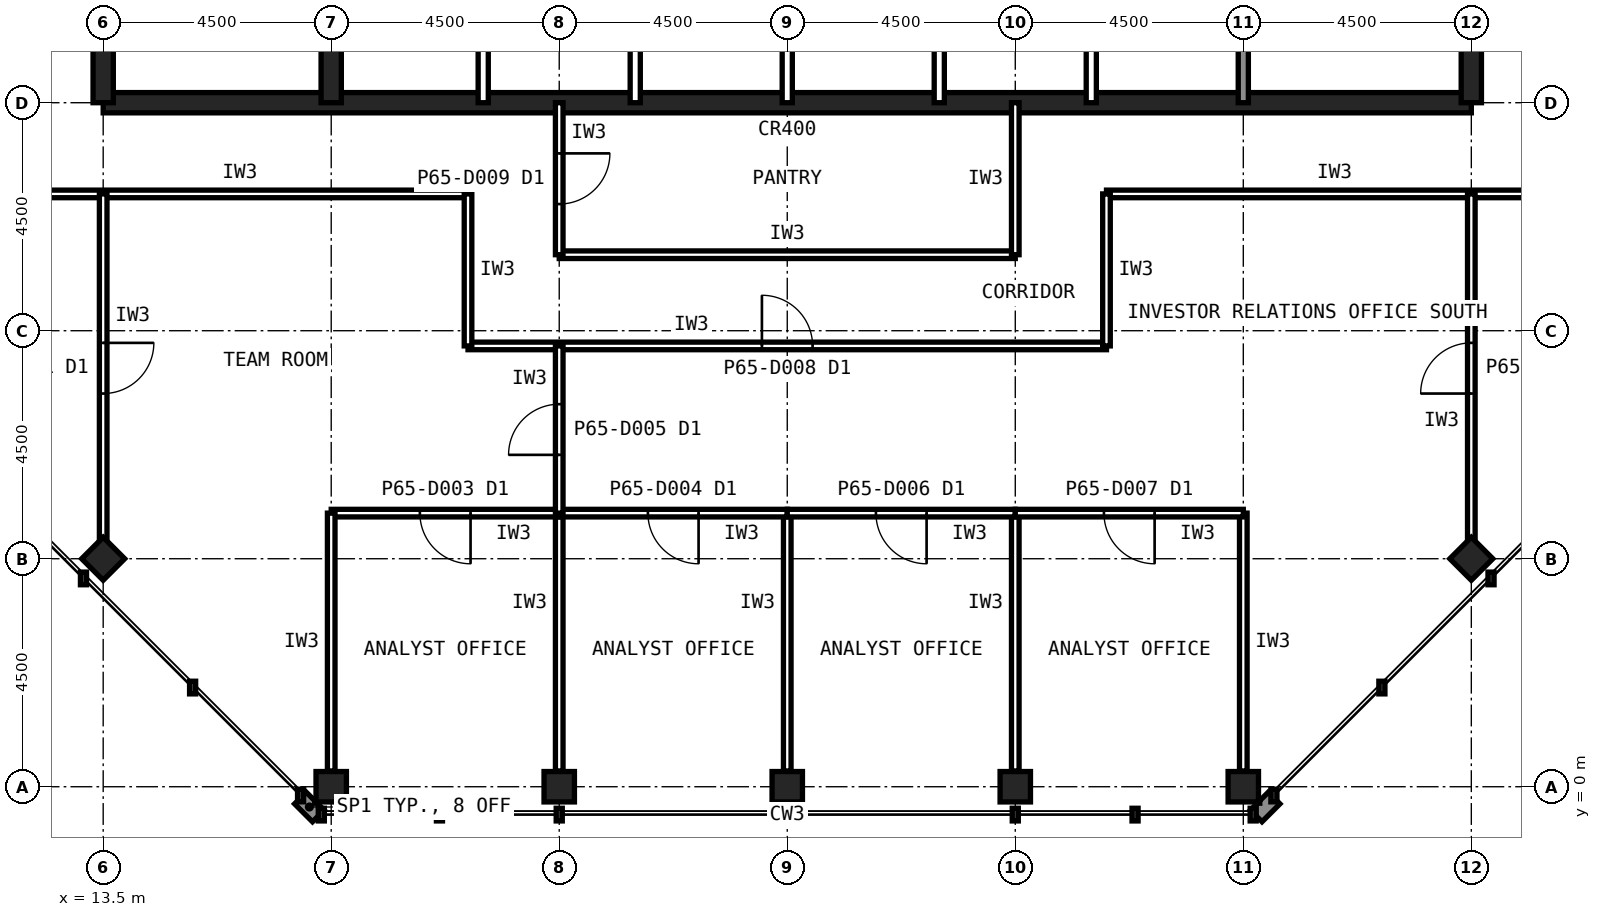
"""IFC4 building model, lengths in metres.
Left out: names, types, materials, properties, quantities, classifications, styles, units other than length and angle.
Written with IfcOpenShell. Run it as: python <this file> out.ifc"""

import sys

from ifc_helpers import new_model, si_unit, direction, frame, frame_2d, origin, origin_2d, place, context, subcontext, project, spatial, rectangle, hollow_rectangle, extrude, element, fill, save


model = new_model("IFC4")
c1 = context("Model", 3, precision=1e-05, world=origin(), true_north=direction((0.0, 1.0)))
c2 = subcontext(c1, "Body", "Model", "MODEL_VIEW")
j1 = project(units=[si_unit("LENGTHUNIT", "METRE"), si_unit("PLANEANGLEUNIT", "RADIAN")], contexts=[c1])
p1 = place(None, origin())
s1 = spatial("IfcSite", under=j1, at=p1, CompositionType="ELEMENT")
p2 = place(p1, origin())
s2 = spatial("IfcBuilding", under=s1, at=p2, CompositionType="ELEMENT")
p3 = place(p2, frame((0.0, 0.0, 270.6)))
s3 = spatial("IfcBuildingStorey", under=s2, at=p3, CompositionType="ELEMENT", Elevation=270.6)
for number, where, z_axis, x_axis in (
    (1, (18.0, 0.0, 0.0), (0.0, 0.0, 1.0), (1.0, 0.0, 0.0)),
    (2, (22.5, 0.0, 0.0), (0.0, 0.0, 1.0), (1.0, 0.0, 0.0)),
    (3, (27.0, 0.0, 0.0), (0.0, 0.0, 1.0), (1.0, 0.0, 0.0)),
    (4, (31.5, 0.0, 0.0), (0.0, 0.0, 1.0), (1.0, 0.0, 0.0)),
    (5, (36.0, 0.0, 0.0), (0.0, 0.0, 1.0), (1.0, 0.0, 0.0)),
    (6, (13.5, 4.5, 0.0), (0.0, 0.0, 1.0), (0.707, 0.707, 0.0)),
    (7, (40.5, 4.5, 0.0), (0.0, 0.0, 1.0), (0.707, 0.707, 0.0)),
):
    element("IfcColumn", number, at=place(p3, frame(where, z_axis=z_axis, x_axis=x_axis)), inside=s3, PredefinedType="COLUMN", context=c2, shape_type="SweptSolid", body=[
        extrude(hollow_rectangle(XDim=0.6, YDim=0.6, WallThickness=0.028, at=origin_2d()), origin(), (0.0, 0.0, 1.0), 4.0),
    ])
p4 = place(p3, frame((13.5, 13.5, 0.0), z_axis=(0.0, 0.0, 1.0), x_axis=(1.0, 0.0, 0.0)))
e8 = element("IfcWall", 8, at=p4, inside=s3, PredefinedType="SHEAR", context=c2, shape_type="SweptSolid", body=[
    extrude(rectangle(XDim=27.0, YDim=0.4, at=frame_2d((13.5, 0.0))), origin(), (0.0, 0.0, 1.0), 4.0),
])
p5 = place(p3, frame((40.5, 13.5, 0.0), z_axis=(0.0, 0.0, 1.0), x_axis=(0.0, 1.0, 0.0)))
e9 = element("IfcWall", 9, at=p5, inside=s3, PredefinedType="SHEAR", context=c2, shape_type="SweptSolid", body=[
    extrude(rectangle(XDim=27.0, YDim=0.4, at=frame_2d((13.5, 0.0))), origin(), (0.0, 0.0, 1.0), 4.0),
])
p6 = place(p5, frame((5.85, 0.0, 0.0)))
e10 = element("IfcOpeningElement", 10, at=p6, cuts=e9, PredefinedType="OPENING", context=c2, shape_type="SweptSolid", body=[
    extrude(rectangle(XDim=1.8, YDim=2.1, at=frame_2d((0.9, 1.05))), frame((0.0, 0.21, 0.0), z_axis=(0.0, -1.0, 0.0), x_axis=(1.0, 0.0, 0.0)), (0.0, 0.0, 1.0), 0.42),
])
p7 = place(p5, frame((19.65, 0.0, 0.0)))
e11 = element("IfcOpeningElement", 11, at=p7, cuts=e9, PredefinedType="OPENING", context=c2, shape_type="SweptSolid", body=[
    extrude(rectangle(XDim=1.2, YDim=2.1, at=frame_2d((0.6, 1.05))), frame((0.0, 0.21, 0.0), z_axis=(0.0, -1.0, 0.0), x_axis=(1.0, 0.0, 0.0)), (0.0, 0.0, 1.0), 0.42),
])
p8 = place(p3, frame((13.5, 40.5, 0.0), z_axis=(0.0, 0.0, 1.0), x_axis=(0.0, -1.0, 0.0)))
e12 = element("IfcWall", 12, at=p8, inside=s3, PredefinedType="SHEAR", context=c2, shape_type="SweptSolid", body=[
    extrude(rectangle(XDim=27.0, YDim=0.4, at=frame_2d((13.5, 0.0))), origin(), (0.0, 0.0, 1.0), 4.0),
])
p9 = place(p8, frame((19.65, 0.0, 0.0)))
e13 = element("IfcOpeningElement", 13, at=p9, cuts=e12, PredefinedType="OPENING", context=c2, shape_type="SweptSolid", body=[
    extrude(rectangle(XDim=1.2, YDim=2.1, at=frame_2d((0.6, 1.05))), frame((0.0, 0.21, 0.0), z_axis=(0.0, -1.0, 0.0), x_axis=(1.0, 0.0, 0.0)), (0.0, 0.0, 1.0), 0.42),
])
p10 = place(p8, frame((5.85, 0.0, 0.0)))
e14 = element("IfcOpeningElement", 14, at=p10, cuts=e12, PredefinedType="OPENING", context=c2, shape_type="SweptSolid", body=[
    extrude(rectangle(XDim=1.8, YDim=2.1, at=frame_2d((0.9, 1.05))), frame((0.0, 0.21, 0.0), z_axis=(0.0, -1.0, 0.0), x_axis=(1.0, 0.0, 0.0)), (0.0, 0.0, 1.0), 0.42),
])
p11 = place(p3, frame((18.0, 13.5, 0.0), z_axis=(0.0, 0.0, 1.0), x_axis=(0.0, 1.0, 0.0)))
e15 = element("IfcWall", 15, at=p11, inside=s3, PredefinedType="SHEAR", context=c2, shape_type="SweptSolid", body=[
    extrude(rectangle(XDim=18.0, YDim=0.4, at=frame_2d((9.0, 0.0))), origin(), (0.0, 0.0, 1.0), 4.0),
])
p12 = place(p3, frame((36.0, 13.5, 0.0), z_axis=(0.0, 0.0, 1.0), x_axis=(0.0, 1.0, 0.0)))
e16 = element("IfcWall", 16, at=p12, inside=s3, PredefinedType="SOLIDWALL", context=c2, shape_type="SweptSolid", body=[
    extrude(rectangle(XDim=4.5, YDim=0.2, at=frame_2d((2.25, 0.0))), origin(), (0.0, 0.0, 1.0), 3.84),
])
for number, where, z_axis, x_axis in (
    (17, (21.0, 13.5, 0.0), (0.0, 0.0, 1.0), (0.0, 1.0, 0.0)),
    (18, (24.0, 13.5, 0.0), (0.0, 0.0, 1.0), (0.0, 1.0, 0.0)),
    (19, (27.0, 13.5, 0.0), (0.0, 0.0, 1.0), (0.0, 1.0, 0.0)),
    (20, (30.0, 13.5, 0.0), (0.0, 0.0, 1.0), (0.0, 1.0, 0.0)),
    (21, (33.0, 13.5, 0.0), (0.0, 0.0, 1.0), (0.0, 1.0, 0.0)),
):
    element("IfcWall", number, at=place(p3, frame(where, z_axis=z_axis, x_axis=x_axis)), inside=s3, PredefinedType="PARTITIONING", context=c2, shape_type="SweptSolid", body=[
        extrude(rectangle(XDim=4.5, YDim=0.2, at=frame_2d((2.25, 0.0))), origin(), (0.0, 0.0, 1.0), 3.84),
    ])
p13 = place(p3, frame((20.7, 8.7, 0.0), z_axis=(0.0, 0.0, 1.0), x_axis=(1.0, 0.0, 0.0)))
e22 = element("IfcWall", 22, at=p13, inside=s3, PredefinedType="PARTITIONING", context=c2, shape_type="SweptSolid", body=[
    extrude(rectangle(XDim=12.6, YDim=0.15, at=frame_2d((6.3, 0.0))), origin(), (0.0, 0.0, 1.0), 3.84),
])
p14 = place(p13, frame((5.8, 0.0, 0.0)))
e23 = element("IfcOpeningElement", 23, at=p14, cuts=e22, PredefinedType="OPENING", context=c2, shape_type="SweptSolid", body=[
    extrude(rectangle(XDim=1.0, YDim=2.1, at=frame_2d((0.5, 1.05))), frame((0.0, 0.085, 0.0), z_axis=(0.0, -1.0, 0.0), x_axis=(1.0, 0.0, 0.0)), (0.0, 0.0, 1.0), 0.17),
])
for number, where, z_axis, x_axis in (
    (24, (11.7, 11.7, 0.0), (0.0, 0.0, 1.0), (1.0, 0.0, 0.0)),
    (25, (33.3, 11.7, 0.0), (0.0, 0.0, 1.0), (1.0, 0.0, 0.0)),
):
    element("IfcWall", number, at=place(p3, frame(where, z_axis=z_axis, x_axis=x_axis)), inside=s3, PredefinedType="PARTITIONING", context=c2, shape_type="SweptSolid", body=[
        extrude(rectangle(XDim=9.0, YDim=0.15, at=frame_2d((4.5, 0.0))), origin(), (0.0, 0.0, 1.0), 3.84),
    ])
for number, where, z_axis, x_axis in (
    (26, (20.7, 11.7, 0.0), (0.0, 0.0, 1.0), (0.0, -1.0, 0.0)),
    (27, (33.3, 8.7, 0.0), (0.0, 0.0, 1.0), (0.0, 1.0, 0.0)),
):
    element("IfcWall", number, at=place(p3, frame(where, z_axis=z_axis, x_axis=x_axis)), inside=s3, PredefinedType="PARTITIONING", context=c2, shape_type="SweptSolid", body=[
        extrude(rectangle(XDim=3.0, YDim=0.15, at=frame_2d((1.5, 0.0))), origin(), (0.0, 0.0, 1.0), 3.84),
    ])
p15 = place(p3, frame((22.5, 10.5, 0.0), z_axis=(0.0, 0.0, 1.0), x_axis=(1.0, 0.0, 0.0)))
e28 = element("IfcWall", 28, at=p15, inside=s3, PredefinedType="PARTITIONING", context=c2, shape_type="SweptSolid", body=[
    extrude(rectangle(XDim=9.0, YDim=0.15, at=frame_2d((4.5, 0.0))), origin(), (0.0, 0.0, 1.0), 3.84),
])
p16 = place(p3, frame((31.5, 10.5, 0.0), z_axis=(0.0, 0.0, 1.0), x_axis=(0.0, 1.0, 0.0)))
e29 = element("IfcWall", 29, at=p16, inside=s3, PredefinedType="PARTITIONING", context=c2, shape_type="SweptSolid", body=[
    extrude(rectangle(XDim=3.0, YDim=0.15, at=frame_2d((1.5, 0.0))), origin(), (0.0, 0.0, 1.0), 2.989),
])
p17 = place(p3, frame((22.5, 13.5, 0.0), z_axis=(0.0, 0.0, 1.0), x_axis=(0.0, -1.0, 0.0)))
e30 = element("IfcWall", 30, at=p17, inside=s3, PredefinedType="PARTITIONING", context=c2, shape_type="SweptSolid", body=[
    extrude(rectangle(XDim=3.0, YDim=0.15, at=frame_2d((1.5, 0.0))), origin(), (0.0, 0.0, 1.0), 2.989),
])
p18 = place(p17, frame((1.0, 0.0, 0.0)))
e31 = element("IfcOpeningElement", 31, at=p18, cuts=e30, PredefinedType="OPENING", context=c2, shape_type="SweptSolid", body=[
    extrude(rectangle(XDim=1.0, YDim=2.1, at=frame_2d((0.5, 1.05))), frame((0.0, 0.085, 0.0), z_axis=(0.0, -1.0, 0.0), x_axis=(1.0, 0.0, 0.0)), (0.0, 0.0, 1.0), 0.17),
])
p19 = place(p3, frame((22.5, 0.31, 0.0), z_axis=(0.0, 0.0, 1.0), x_axis=(0.0, 1.0, 0.0)))
e32 = element("IfcWall", 32, at=p19, inside=s3, PredefinedType="PARTITIONING", context=c2, shape_type="SweptSolid", body=[
    extrude(rectangle(XDim=5.09, YDim=0.15, at=frame_2d((2.545, 0.0))), origin(), (0.0, 0.0, 1.0), 2.989),
])
p20 = place(p3, frame((22.5, 5.4, 0.0), z_axis=(0.0, 0.0, 1.0), x_axis=(-1.0, 0.0, 0.0)))
e33 = element("IfcWall", 33, at=p20, inside=s3, PredefinedType="PARTITIONING", context=c2, shape_type="SweptSolid", body=[
    extrude(rectangle(XDim=4.5, YDim=0.15, at=frame_2d((2.25, 0.0))), origin(), (0.0, 0.0, 1.0), 3.84),
])
p21 = place(p20, frame((1.75, 0.0, 0.0)))
e34 = element("IfcOpeningElement", 34, at=p21, cuts=e33, PredefinedType="OPENING", context=c2, shape_type="SweptSolid", body=[
    extrude(rectangle(XDim=1.0, YDim=2.1, at=frame_2d((0.5, 1.05))), frame((0.0, 0.085, 0.0), z_axis=(0.0, -1.0, 0.0), x_axis=(1.0, 0.0, 0.0)), (0.0, 0.0, 1.0), 0.17),
])
for number, where, z_axis, x_axis in (
    (35, (18.0, 5.4, 0.0), (0.0, 0.0, 1.0), (0.0, -1.0, 0.0)),
    (36, (27.0, 0.31, 0.0), (0.0, 0.0, 1.0), (0.0, 1.0, 0.0)),
):
    element("IfcWall", number, at=place(p3, frame(where, z_axis=z_axis, x_axis=x_axis)), inside=s3, PredefinedType="PARTITIONING", context=c2, shape_type="SweptSolid", body=[
        extrude(rectangle(XDim=5.09, YDim=0.15, at=frame_2d((2.545, 0.0))), origin(), (0.0, 0.0, 1.0), 2.989),
    ])
p22 = place(p3, frame((27.0, 5.4, 0.0), z_axis=(0.0, 0.0, 1.0), x_axis=(-1.0, 0.0, 0.0)))
e37 = element("IfcWall", 37, at=p22, inside=s3, PredefinedType="PARTITIONING", context=c2, shape_type="SweptSolid", body=[
    extrude(rectangle(XDim=4.5, YDim=0.15, at=frame_2d((2.25, 0.0))), origin(), (0.0, 0.0, 1.0), 3.84),
])
p23 = place(p22, frame((1.75, 0.0, 0.0)))
e38 = element("IfcOpeningElement", 38, at=p23, cuts=e37, PredefinedType="OPENING", context=c2, shape_type="SweptSolid", body=[
    extrude(rectangle(XDim=1.0, YDim=2.1, at=frame_2d((0.5, 1.05))), frame((0.0, 0.085, 0.0), z_axis=(0.0, -1.0, 0.0), x_axis=(1.0, 0.0, 0.0)), (0.0, 0.0, 1.0), 0.17),
])
p24 = place(p3, frame((31.5, 0.31, 0.0), z_axis=(0.0, 0.0, 1.0), x_axis=(0.0, 1.0, 0.0)))
e39 = element("IfcWall", 39, at=p24, inside=s3, PredefinedType="PARTITIONING", context=c2, shape_type="SweptSolid", body=[
    extrude(rectangle(XDim=5.09, YDim=0.15, at=frame_2d((2.545, 0.0))), origin(), (0.0, 0.0, 1.0), 2.989),
])
p25 = place(p3, frame((31.5, 5.4, 0.0), z_axis=(0.0, 0.0, 1.0), x_axis=(-1.0, 0.0, 0.0)))
e40 = element("IfcWall", 40, at=p25, inside=s3, PredefinedType="PARTITIONING", context=c2, shape_type="SweptSolid", body=[
    extrude(rectangle(XDim=4.5, YDim=0.15, at=frame_2d((2.25, 0.0))), origin(), (0.0, 0.0, 1.0), 3.84),
])
p26 = place(p25, frame((1.75, 0.0, 0.0)))
e41 = element("IfcOpeningElement", 41, at=p26, cuts=e40, PredefinedType="OPENING", context=c2, shape_type="SweptSolid", body=[
    extrude(rectangle(XDim=1.0, YDim=2.1, at=frame_2d((0.5, 1.05))), frame((0.0, 0.085, 0.0), z_axis=(0.0, -1.0, 0.0), x_axis=(1.0, 0.0, 0.0)), (0.0, 0.0, 1.0), 0.17),
])
p27 = place(p3, frame((36.0, 0.31, 0.0), z_axis=(0.0, 0.0, 1.0), x_axis=(0.0, 1.0, 0.0)))
e42 = element("IfcWall", 42, at=p27, inside=s3, PredefinedType="PARTITIONING", context=c2, shape_type="SweptSolid", body=[
    extrude(rectangle(XDim=5.09, YDim=0.15, at=frame_2d((2.545, 0.0))), origin(), (0.0, 0.0, 1.0), 2.989),
])
p28 = place(p3, frame((36.0, 5.4, 0.0), z_axis=(0.0, 0.0, 1.0), x_axis=(-1.0, 0.0, 0.0)))
e43 = element("IfcWall", 43, at=p28, inside=s3, PredefinedType="PARTITIONING", context=c2, shape_type="SweptSolid", body=[
    extrude(rectangle(XDim=4.5, YDim=0.15, at=frame_2d((2.25, 0.0))), origin(), (0.0, 0.0, 1.0), 3.84),
])
p29 = place(p28, frame((1.75, 0.0, 0.0)))
e44 = element("IfcOpeningElement", 44, at=p29, cuts=e43, PredefinedType="OPENING", context=c2, shape_type="SweptSolid", body=[
    extrude(rectangle(XDim=1.0, YDim=2.1, at=frame_2d((0.5, 1.05))), frame((0.0, 0.085, 0.0), z_axis=(0.0, -1.0, 0.0), x_axis=(1.0, 0.0, 0.0)), (0.0, 0.0, 1.0), 0.17),
])
p30 = place(p3, frame((40.5, 4.82, 0.0), z_axis=(0.0, 0.0, 1.0), x_axis=(0.0, 1.0, 0.0)))
e45 = element("IfcWall", 45, at=p30, inside=s3, PredefinedType="PARTITIONING", context=c2, shape_type="SweptSolid", body=[
    extrude(rectangle(XDim=6.88, YDim=0.15, at=frame_2d((3.44, 0.0))), origin(), (0.0, 0.0, 1.0), 2.989),
])
p31 = place(p30, frame((2.94, 0.0, 0.0)))
e46 = element("IfcOpeningElement", 46, at=p31, cuts=e45, PredefinedType="OPENING", context=c2, shape_type="SweptSolid", body=[
    extrude(rectangle(XDim=1.0, YDim=2.1, at=frame_2d((0.5, 1.05))), frame((0.0, 0.085, 0.0), z_axis=(0.0, -1.0, 0.0), x_axis=(1.0, 0.0, 0.0)), (0.0, 0.0, 1.0), 0.17),
])
p32 = place(p3, frame((22.5, 5.4, 0.0), z_axis=(0.0, 0.0, 1.0), x_axis=(0.0, 1.0, 0.0)))
e47 = element("IfcWall", 47, at=p32, inside=s3, PredefinedType="PARTITIONING", context=c2, shape_type="SweptSolid", body=[
    extrude(rectangle(XDim=3.3, YDim=0.15, at=frame_2d((1.65, 0.0))), origin(), (0.0, 0.0, 1.0), 2.989),
])
p33 = place(p32, frame((1.15, 0.0, 0.0)))
e48 = element("IfcOpeningElement", 48, at=p33, cuts=e47, PredefinedType="OPENING", context=c2, shape_type="SweptSolid", body=[
    extrude(rectangle(XDim=1.0, YDim=2.1, at=frame_2d((0.5, 1.05))), frame((0.0, 0.085, 0.0), z_axis=(0.0, -1.0, 0.0), x_axis=(1.0, 0.0, 0.0)), (0.0, 0.0, 1.0), 0.17),
])
p34 = place(p3, frame((13.5, 11.7, 0.0), z_axis=(0.0, 0.0, 1.0), x_axis=(0.0, -1.0, 0.0)))
e49 = element("IfcWall", 49, at=p34, inside=s3, PredefinedType="PARTITIONING", context=c2, shape_type="SweptSolid", body=[
    extrude(rectangle(XDim=6.88, YDim=0.15, at=frame_2d((3.44, 0.0))), origin(), (0.0, 0.0, 1.0), 2.989),
])
p35 = place(p34, frame((2.94, 0.0, 0.0)))
e50 = element("IfcOpeningElement", 50, at=p35, cuts=e49, PredefinedType="OPENING", context=c2, shape_type="SweptSolid", body=[
    extrude(rectangle(XDim=1.0, YDim=2.1, at=frame_2d((0.5, 1.05))), frame((0.0, 0.085, 0.0), z_axis=(0.0, -1.0, 0.0), x_axis=(1.0, 0.0, 0.0)), (0.0, 0.0, 1.0), 0.17),
])
p36 = place(p14, origin())
e51 = element("IfcDoor", 51, at=p36, inside=s3, OperationType="SINGLE_SWING_LEFT", PredefinedType="DOOR", context=c2, shape_type="SweptSolid", body=[
    extrude(rectangle(XDim=1.0, YDim=2.1, at=frame_2d((0.5, 1.05))), frame((0.0, 0.025, 0.0), z_axis=(0.0, -1.0, 0.0), x_axis=(1.0, 0.0, 0.0)), (0.0, 0.0, 1.0), 0.05),
])
fill(e23, e51)
p37 = place(p18, origin())
e52 = element("IfcDoor", 52, at=p37, inside=s3, OperationType="SINGLE_SWING_LEFT", PredefinedType="DOOR", context=c2, shape_type="SweptSolid", body=[
    extrude(rectangle(XDim=1.0, YDim=2.1, at=frame_2d((0.5, 1.05))), frame((0.0, 0.025, 0.0), z_axis=(0.0, -1.0, 0.0), x_axis=(1.0, 0.0, 0.0)), (0.0, 0.0, 1.0), 0.05),
])
fill(e31, e52)
p38 = place(p21, origin())
e53 = element("IfcDoor", 53, at=p38, inside=s3, OperationType="SINGLE_SWING_LEFT", PredefinedType="DOOR", context=c2, shape_type="SweptSolid", body=[
    extrude(rectangle(XDim=1.0, YDim=2.1, at=frame_2d((0.5, 1.05))), frame((0.0, 0.025, 0.0), z_axis=(0.0, -1.0, 0.0), x_axis=(1.0, 0.0, 0.0)), (0.0, 0.0, 1.0), 0.05),
])
fill(e34, e53)
p39 = place(p23, origin())
e54 = element("IfcDoor", 54, at=p39, inside=s3, OperationType="SINGLE_SWING_LEFT", PredefinedType="DOOR", context=c2, shape_type="SweptSolid", body=[
    extrude(rectangle(XDim=1.0, YDim=2.1, at=frame_2d((0.5, 1.05))), frame((0.0, 0.025, 0.0), z_axis=(0.0, -1.0, 0.0), x_axis=(1.0, 0.0, 0.0)), (0.0, 0.0, 1.0), 0.05),
])
fill(e38, e54)
p40 = place(p26, origin())
e55 = element("IfcDoor", 55, at=p40, inside=s3, OperationType="SINGLE_SWING_LEFT", PredefinedType="DOOR", context=c2, shape_type="SweptSolid", body=[
    extrude(rectangle(XDim=1.0, YDim=2.1, at=frame_2d((0.5, 1.05))), frame((0.0, 0.025, 0.0), z_axis=(0.0, -1.0, 0.0), x_axis=(1.0, 0.0, 0.0)), (0.0, 0.0, 1.0), 0.05),
])
fill(e41, e55)
p41 = place(p29, origin())
e56 = element("IfcDoor", 56, at=p41, inside=s3, OperationType="SINGLE_SWING_LEFT", PredefinedType="DOOR", context=c2, shape_type="SweptSolid", body=[
    extrude(rectangle(XDim=1.0, YDim=2.1, at=frame_2d((0.5, 1.05))), frame((0.0, 0.025, 0.0), z_axis=(0.0, -1.0, 0.0), x_axis=(1.0, 0.0, 0.0)), (0.0, 0.0, 1.0), 0.05),
])
fill(e44, e56)
p42 = place(p31, origin())
e57 = element("IfcDoor", 57, at=p42, inside=s3, OperationType="SINGLE_SWING_LEFT", PredefinedType="DOOR", context=c2, shape_type="SweptSolid", body=[
    extrude(rectangle(XDim=1.0, YDim=2.1, at=frame_2d((0.5, 1.05))), frame((0.0, 0.025, 0.0), z_axis=(0.0, -1.0, 0.0), x_axis=(1.0, 0.0, 0.0)), (0.0, 0.0, 1.0), 0.05),
])
fill(e46, e57)
p43 = place(p33, origin())
e58 = element("IfcDoor", 58, at=p43, inside=s3, OperationType="SINGLE_SWING_LEFT", PredefinedType="DOOR", context=c2, shape_type="SweptSolid", body=[
    extrude(rectangle(XDim=1.0, YDim=2.1, at=frame_2d((0.5, 1.05))), frame((0.0, 0.025, 0.0), z_axis=(0.0, -1.0, 0.0), x_axis=(1.0, 0.0, 0.0)), (0.0, 0.0, 1.0), 0.05),
])
fill(e48, e58)
p44 = place(p35, origin())
e59 = element("IfcDoor", 59, at=p44, inside=s3, OperationType="SINGLE_SWING_LEFT", PredefinedType="DOOR", context=c2, shape_type="SweptSolid", body=[
    extrude(rectangle(XDim=1.0, YDim=2.1, at=frame_2d((0.5, 1.05))), frame((0.0, 0.025, 0.0), z_axis=(0.0, -1.0, 0.0), x_axis=(1.0, 0.0, 0.0)), (0.0, 0.0, 1.0), 0.05),
])
fill(e50, e59)
save(model, sys.argv[1])
